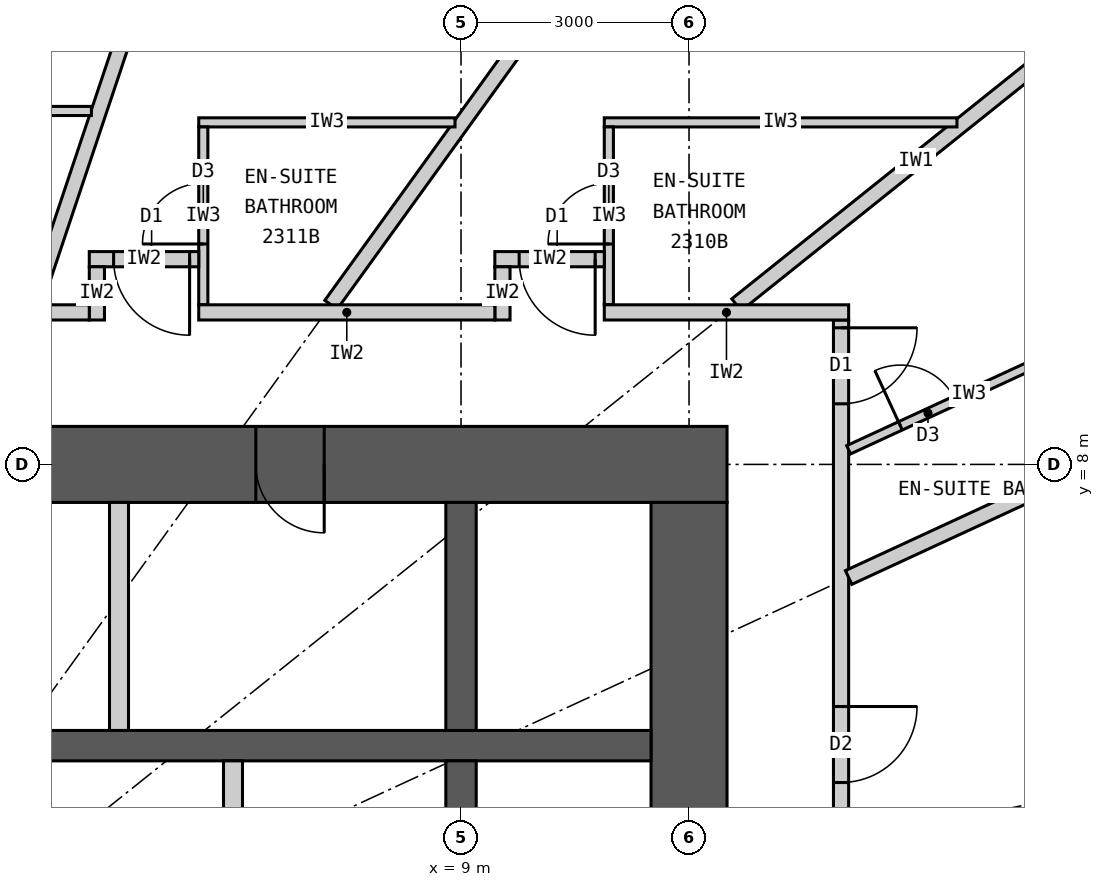
"""IFC4 building model, lengths in metres.
Left out: names, types, materials, properties, quantities, classifications, styles, units other than length and angle.
Written with IfcOpenShell. Run it as: python <this file> out.ifc"""

import sys

from ifc_helpers import new_model, si_unit, direction, frame, frame_2d, origin, place, context, subcontext, project, spatial, rectangle, extrude, element, fill, save


model = new_model("IFC4")
c1 = context("Model", 3, precision=1e-05, world=origin(), true_north=direction((0.0, 1.0)))
c2 = subcontext(c1, "Body", "Model", "MODEL_VIEW")
j1 = project(units=[si_unit("LENGTHUNIT", "METRE"), si_unit("PLANEANGLEUNIT", "RADIAN")], contexts=[c1])
p1 = place(None, origin())
s1 = spatial("IfcSite", under=j1, at=p1, CompositionType="ELEMENT")
p2 = place(p1, origin())
s2 = spatial("IfcBuilding", under=s1, at=p2, CompositionType="ELEMENT")
p3 = place(p2, frame((0.0, 0.0, 90.3)))
s3 = spatial("IfcBuildingStorey", under=s2, at=p3, CompositionType="ELEMENT", Elevation=90.3)
p4 = place(p3, frame((-12.5, 8.0, 0.0), z_axis=(0.0, 0.0, 1.0), x_axis=(1.0, 0.0, 0.0)))
e1 = element("IfcWall", 1, at=p4, inside=s3, PredefinedType="SHEAR", context=c2, shape_type="SweptSolid", body=[
    extrude(rectangle(XDim=25.0, YDim=1.0, at=frame_2d((12.5, 0.0))), origin(), (0.0, 0.0, 1.0), 3.3),
])
p5 = place(p4, frame((11.2, 0.0, 0.0)))
e2 = element("IfcOpeningElement", 2, at=p5, cuts=e1, PredefinedType="OPENING", context=c2, shape_type="SweptSolid", body=[
    extrude(rectangle(XDim=1.2, YDim=2.2, at=frame_2d((0.6, 1.1))), frame((0.0, 0.51, 0.0), z_axis=(0.0, -1.0, 0.0), x_axis=(1.0, 0.0, 0.0)), (0.0, 0.0, 1.0), 1.02),
])
p6 = place(p4, frame((18.8, 0.0, 0.0)))
e3 = element("IfcOpeningElement", 3, at=p6, cuts=e1, PredefinedType="OPENING", context=c2, shape_type="SweptSolid", body=[
    extrude(rectangle(XDim=0.9, YDim=2.2, at=frame_2d((0.45, 1.1))), frame((0.0, 0.51, 0.0), z_axis=(0.0, -1.0, 0.0), x_axis=(1.0, 0.0, 0.0)), (0.0, 0.0, 1.0), 1.02),
])
p7 = place(p3, frame((12.0, -7.5, 0.0), z_axis=(0.0, 0.0, 1.0), x_axis=(0.0, 1.0, 0.0)))
e4 = element("IfcWall", 4, at=p7, inside=s3, PredefinedType="SHEAR", context=c2, shape_type="SweptSolid", body=[
    extrude(rectangle(XDim=15.0, YDim=1.0, at=frame_2d((7.5, 0.0))), origin(), (0.0, 0.0, 1.0), 3.3),
])
p8 = place(p7, frame((6.6, 0.0, 0.0)))
e5 = element("IfcOpeningElement", 5, at=p8, cuts=e4, PredefinedType="OPENING", context=c2, shape_type="SweptSolid", body=[
    extrude(rectangle(XDim=1.8, YDim=2.2, at=frame_2d((0.9, 1.1))), frame((0.0, 0.51, 0.0), z_axis=(0.0, -1.0, 0.0), x_axis=(1.0, 0.0, 0.0)), (0.0, 0.0, 1.0), 1.02),
])
p9 = place(p3, frame((-11.5, 4.3, 0.0), z_axis=(0.0, 0.0, 1.0), x_axis=(1.0, 0.0, 0.0)))
e6 = element("IfcWall", 6, at=p9, inside=s3, PredefinedType="SHEAR", context=c2, shape_type="SweptSolid", body=[
    extrude(rectangle(XDim=23.0, YDim=0.4, at=frame_2d((11.5, 0.0))), origin(), (0.0, 0.0, 1.0), 3.3),
])
p10 = place(p3, frame((9.0, 4.5, 0.0), z_axis=(0.0, 0.0, 1.0), x_axis=(0.0, 1.0, 0.0)))
e7 = element("IfcWall", 7, at=p10, inside=s3, PredefinedType="SHEAR", context=c2, shape_type="SweptSolid", body=[
    extrude(rectangle(XDim=3.0, YDim=0.4, at=frame_2d((1.5, 0.0))), origin(), (0.0, 0.0, 1.0), 3.3),
])
p11 = place(p3, frame((9.0, 1.75, 0.0), z_axis=(0.0, 0.0, 1.0), x_axis=(0.0, 1.0, 0.0)))
e8 = element("IfcWall", 8, at=p11, inside=s3, PredefinedType="SHEAR", context=c2, shape_type="SweptSolid", body=[
    extrude(rectangle(XDim=2.35, YDim=0.4, at=frame_2d((1.175, 0.0))), origin(), (0.0, 0.0, 1.0), 3.3),
])
p12 = place(p3, frame((4.5, 4.5, 0.0), z_axis=(0.0, 0.0, 1.0), x_axis=(0.0, 1.0, 0.0)))
e9 = element("IfcWall", 9, at=p12, inside=s3, PredefinedType="PARTITIONING", context=c2, shape_type="SweptSolid", body=[
    extrude(rectangle(XDim=3.0, YDim=0.25, at=frame_2d((1.5, 0.0))), origin(), (0.0, 0.0, 1.0), 3.3),
])
p13 = place(p3, frame((6.0, 1.75, 0.0), z_axis=(0.0, 0.0, 1.0), x_axis=(0.0, 1.0, 0.0)))
e10 = element("IfcWall", 10, at=p13, inside=s3, PredefinedType="PARTITIONING", context=c2, shape_type="SweptSolid", body=[
    extrude(rectangle(XDim=2.35, YDim=0.25, at=frame_2d((1.175, 0.0))), origin(), (0.0, 0.0, 1.0), 3.3),
])
p14 = place(p3, frame((14.0, -9.9, 0.0), z_axis=(0.0, 0.0, 1.0), x_axis=(0.0, 1.0, 0.0)))
e11 = element("IfcWall", 11, at=p14, inside=s3, PredefinedType="PARTITIONING", context=c2, shape_type="SweptSolid", body=[
    extrude(rectangle(XDim=19.8, YDim=0.2, at=frame_2d((9.9, 0.0))), origin(), (0.0, 0.0, 1.0), 3.05),
])
p15 = place(p14, frame((0.204, 0.0, 0.0)))
e12 = element("IfcOpeningElement", 12, at=p15, cuts=e11, PredefinedType="OPENING", context=c2, shape_type="SweptSolid", body=[
    extrude(rectangle(XDim=1.0, YDim=2.2, at=frame_2d((0.5, 1.1))), frame((0.0, 0.11, 0.0), z_axis=(0.0, -1.0, 0.0), x_axis=(1.0, 0.0, 0.0)), (0.0, 0.0, 1.0), 0.22),
])
p16 = place(p14, frame((13.715, 0.0, 0.0)))
e13 = element("IfcOpeningElement", 13, at=p16, cuts=e11, PredefinedType="OPENING", context=c2, shape_type="SweptSolid", body=[
    extrude(rectangle(XDim=1.0, YDim=2.2, at=frame_2d((0.5, 1.1))), frame((0.0, 0.11, 0.0), z_axis=(0.0, -1.0, 0.0), x_axis=(1.0, 0.0, 0.0)), (0.0, 0.0, 1.0), 0.22),
])
p17 = place(p14, frame((18.698, 0.0, 0.0)))
e14 = element("IfcOpeningElement", 14, at=p17, cuts=e11, PredefinedType="OPENING", context=c2, shape_type="SweptSolid", body=[
    extrude(rectangle(XDim=1.0, YDim=2.2, at=frame_2d((0.5, 1.1))), frame((0.0, 0.11, 0.0), z_axis=(0.0, -1.0, 0.0), x_axis=(1.0, 0.0, 0.0)), (0.0, 0.0, 1.0), 0.22),
])
p18 = place(p3, frame((14.1, 6.512, 0.0), z_axis=(0.0, 0.0, 1.0), x_axis=(0.907832871056, 0.419332181247, 0.0)))
e15 = element("IfcWall", 15, at=p18, inside=s3, PredefinedType="PARTITIONING", context=c2, shape_type="SweptSolid", body=[
    extrude(rectangle(XDim=8.023, YDim=0.2, at=frame_2d((4.011, 0.0))), origin(), (0.0, 0.0, 1.0), 2.15),
])
p19 = place(p3, frame((12.625, 10.1, 0.0), z_axis=(0.0, 0.0, 1.0), x_axis=(0.780892451574, 0.624665493744, 0.0)))
e16 = element("IfcWall", 16, at=p19, inside=s3, PredefinedType="PARTITIONING", context=c2, shape_type="SweptSolid", body=[
    extrude(rectangle(XDim=6.045, YDim=0.2, at=frame_2d((3.022, 0.0))), origin(), (0.0, 0.0, 1.0), 2.25),
])
p20 = place(p3, frame((7.289, 10.1, 0.0), z_axis=(0.0, 0.0, 1.0), x_axis=(0.585198353053, 0.810890182197, 0.0)))
e17 = element("IfcWall", 17, at=p20, inside=s3, PredefinedType="PARTITIONING", context=c2, shape_type="SweptSolid", body=[
    extrude(rectangle(XDim=8.36, YDim=0.2, at=frame_2d((4.18, 0.0))), origin(), (0.0, 0.0, 1.0), 2.15),
])
p21 = place(p3, frame((3.383, 10.1, 0.0), z_axis=(0.0, 0.0, 1.0), x_axis=(0.31759592231, 0.948226149256, 0.0)))
e18 = element("IfcWall", 18, at=p21, inside=s3, PredefinedType="PARTITIONING", context=c2, shape_type="SweptSolid", body=[
    extrude(rectangle(XDim=9.098, YDim=0.2, at=frame_2d((4.549, 0.0))), origin(), (0.0, 0.0, 1.0), 2.15),
])
p22 = place(p3, frame((14.1, 8.193, 0.0), z_axis=(0.0, 0.0, 1.0), x_axis=(0.907836493557, 0.419324338628, 0.0)))
e19 = element("IfcWall", 19, at=p22, inside=s3, PredefinedType="PARTITIONING", context=c2, shape_type="SweptSolid", body=[
    extrude(rectangle(XDim=3.49, YDim=0.12, at=frame_2d((1.745, 0.0))), origin(), (0.0, 0.0, 1.0), 3.05),
])
p23 = place(p22, frame((0.75, 0.0, 0.0)))
e20 = element("IfcOpeningElement", 20, at=p23, cuts=e19, PredefinedType="OPENING", context=c2, shape_type="SweptSolid", body=[
    extrude(rectangle(XDim=0.8, YDim=2.1, at=frame_2d((0.4, 1.05))), frame((0.0, 0.07, 0.0), z_axis=(0.0, -1.0, 0.0), x_axis=(1.0, 0.0, 0.0)), (0.0, 0.0, 1.0), 0.14),
])
p24 = place(p3, frame((15.525, 12.5, 0.0), z_axis=(0.0, 0.0, 1.0), x_axis=(-1.0, 0.0, 0.0)))
e21 = element("IfcWall", 21, at=p24, inside=s3, PredefinedType="PARTITIONING", context=c2, shape_type="SweptSolid", body=[
    extrude(rectangle(XDim=4.64, YDim=0.12, at=frame_2d((2.32, 0.0))), origin(), (0.0, 0.0, 1.0), 3.05),
])
p25 = place(p3, frame((10.945, 10.1, 0.0), z_axis=(0.0, 0.0, 1.0), x_axis=(0.0, 1.0, 0.0)))
e22 = element("IfcWall", 22, at=p25, inside=s3, PredefinedType="PARTITIONING", context=c2, shape_type="SweptSolid", body=[
    extrude(rectangle(XDim=2.34, YDim=0.12, at=frame_2d((1.17, 0.0))), origin(), (0.0, 0.0, 1.0), 3.05),
])
p26 = place(p25, frame((0.8, 0.0, 0.0)))
e23 = element("IfcOpeningElement", 23, at=p26, cuts=e22, PredefinedType="OPENING", context=c2, shape_type="SweptSolid", body=[
    extrude(rectangle(XDim=0.8, YDim=2.1, at=frame_2d((0.4, 1.05))), frame((0.0, 0.07, 0.0), z_axis=(0.0, -1.0, 0.0), x_axis=(1.0, 0.0, 0.0)), (0.0, 0.0, 1.0), 0.14),
])
p27 = place(p3, frame((8.921, 12.5, 0.0), z_axis=(0.0, 0.0, 1.0), x_axis=(-1.0, 0.0, 0.0)))
e24 = element("IfcWall", 24, at=p27, inside=s3, PredefinedType="PARTITIONING", context=c2, shape_type="SweptSolid", body=[
    extrude(rectangle(XDim=3.372, YDim=0.12, at=frame_2d((1.686, 0.0))), origin(), (0.0, 0.0, 1.0), 3.05),
])
p28 = place(p3, frame((5.609, 10.1, 0.0), z_axis=(0.0, 0.0, 1.0), x_axis=(0.0, 1.0, 0.0)))
e25 = element("IfcWall", 25, at=p28, inside=s3, PredefinedType="PARTITIONING", context=c2, shape_type="SweptSolid", body=[
    extrude(rectangle(XDim=2.34, YDim=0.12, at=frame_2d((1.17, 0.0))), origin(), (0.0, 0.0, 1.0), 3.05),
])
p29 = place(p28, frame((0.8, 0.0, 0.0)))
e26 = element("IfcOpeningElement", 26, at=p29, cuts=e25, PredefinedType="OPENING", context=c2, shape_type="SweptSolid", body=[
    extrude(rectangle(XDim=0.8, YDim=2.1, at=frame_2d((0.4, 1.05))), frame((0.0, 0.07, 0.0), z_axis=(0.0, -1.0, 0.0), x_axis=(1.0, 0.0, 0.0)), (0.0, 0.0, 1.0), 0.14),
])
p30 = place(p3, frame((4.137, 12.65, 0.0), z_axis=(0.0, 0.0, 1.0), x_axis=(-1.0, 0.0, 0.0)))
e27 = element("IfcWall", 27, at=p30, inside=s3, PredefinedType="PARTITIONING", context=c2, shape_type="SweptSolid", body=[
    extrude(rectangle(XDim=2.494, YDim=0.12, at=frame_2d((1.247, 0.0))), origin(), (0.0, 0.0, 1.0), 3.05),
])
p31 = place(p3, frame((9.445, 10.7, 0.0), z_axis=(0.0, 0.0, 1.0), x_axis=(1.0, 0.0, 0.0)))
e28 = element("IfcWall", 28, at=p31, inside=s3, PredefinedType="PARTITIONING", context=c2, shape_type="SweptSolid", body=[
    extrude(rectangle(XDim=1.44, YDim=0.2, at=frame_2d((0.72, 0.0))), origin(), (0.0, 0.0, 1.0), 3.05),
])
p32 = place(p31, frame((0.32, 0.0, 0.0)))
e29 = element("IfcOpeningElement", 29, at=p32, cuts=e28, PredefinedType="OPENING", context=c2, shape_type="SweptSolid", body=[
    extrude(rectangle(XDim=1.0, YDim=2.2, at=frame_2d((0.5, 1.1))), frame((0.0, 0.11, 0.0), z_axis=(0.0, -1.0, 0.0), x_axis=(1.0, 0.0, 0.0)), (0.0, 0.0, 1.0), 0.22),
])
p33 = place(p3, frame((9.545, 9.9, 0.0), z_axis=(0.0, 0.0, 1.0), x_axis=(0.0, 1.0, 0.0)))
e30 = element("IfcWall", 30, at=p33, inside=s3, PredefinedType="PARTITIONING", context=c2, shape_type="SweptSolid", body=[
    extrude(rectangle(XDim=0.7, YDim=0.2, at=frame_2d((0.35, 0.0))), origin(), (0.0, 0.0, 1.0), 3.05),
])
p34 = place(p3, frame((4.109, 10.7, 0.0), z_axis=(0.0, 0.0, 1.0), x_axis=(1.0, 0.0, 0.0)))
e31 = element("IfcWall", 31, at=p34, inside=s3, PredefinedType="PARTITIONING", context=c2, shape_type="SweptSolid", body=[
    extrude(rectangle(XDim=1.44, YDim=0.2, at=frame_2d((0.72, 0.0))), origin(), (0.0, 0.0, 1.0), 3.05),
])
p35 = place(p34, frame((0.32, 0.0, 0.0)))
e32 = element("IfcOpeningElement", 32, at=p35, cuts=e31, PredefinedType="OPENING", context=c2, shape_type="SweptSolid", body=[
    extrude(rectangle(XDim=1.0, YDim=2.2, at=frame_2d((0.5, 1.1))), frame((0.0, 0.11, 0.0), z_axis=(0.0, -1.0, 0.0), x_axis=(1.0, 0.0, 0.0)), (0.0, 0.0, 1.0), 0.22),
])
p36 = place(p3, frame((4.209, 9.9, 0.0), z_axis=(0.0, 0.0, 1.0), x_axis=(0.0, 1.0, 0.0)))
e33 = element("IfcWall", 33, at=p36, inside=s3, PredefinedType="PARTITIONING", context=c2, shape_type="SweptSolid", body=[
    extrude(rectangle(XDim=0.7, YDim=0.2, at=frame_2d((0.35, 0.0))), origin(), (0.0, 0.0, 1.0), 3.05),
])
p37 = place(p3, frame((1.643, 10.0, 0.0), z_axis=(0.0, 0.0, 1.0), x_axis=(1.0, 0.0, 0.0)))
e34 = element("IfcWall", 34, at=p37, inside=s3, PredefinedType="PARTITIONING", context=c2, shape_type="SweptSolid", body=[
    extrude(rectangle(XDim=2.466, YDim=0.2, at=frame_2d((1.233, 0.0))), origin(), (0.0, 0.0, 1.0), 3.05),
])
p38 = place(p3, frame((5.549, 10.0, 0.0), z_axis=(0.0, 0.0, 1.0), x_axis=(1.0, 0.0, 0.0)))
e35 = element("IfcWall", 35, at=p38, inside=s3, PredefinedType="PARTITIONING", context=c2, shape_type="SweptSolid", body=[
    extrude(rectangle(XDim=3.896, YDim=0.2, at=frame_2d((1.948, 0.0))), origin(), (0.0, 0.0, 1.0), 3.05),
])
p39 = place(p3, frame((10.885, 10.0, 0.0), z_axis=(0.0, 0.0, 1.0), x_axis=(1.0, 0.0, 0.0)))
e36 = element("IfcWall", 36, at=p39, inside=s3, PredefinedType="PARTITIONING", context=c2, shape_type="SweptSolid", body=[
    extrude(rectangle(XDim=3.215, YDim=0.2, at=frame_2d((1.607, 0.0))), origin(), (0.0, 0.0, 1.0), 3.05),
])
p40 = place(p16, origin())
e37 = element("IfcDoor", 37, at=p40, inside=s3, OperationType="SINGLE_SWING_RIGHT", PredefinedType="DOOR", context=c2, shape_type="SweptSolid", body=[
    extrude(rectangle(XDim=1.0, YDim=2.2, at=frame_2d((0.5, 1.1))), frame((0.0, 0.025, 0.0), z_axis=(0.0, -1.0, 0.0), x_axis=(1.0, 0.0, 0.0)), (0.0, 0.0, 1.0), 0.05),
])
fill(e13, e37)
p41 = place(p23, origin())
e38 = element("IfcDoor", 38, at=p41, inside=s3, OperationType="SINGLE_SWING_LEFT", PredefinedType="DOOR", context=c2, shape_type="SweptSolid", body=[
    extrude(rectangle(XDim=0.8, YDim=2.1, at=frame_2d((0.4, 1.05))), frame((0.0, 0.025, 0.0), z_axis=(0.0, -1.0, 0.0), x_axis=(1.0, 0.0, 0.0)), (0.0, 0.0, 1.0), 0.05),
])
fill(e20, e38)
p42 = place(p17, origin())
e39 = element("IfcDoor", 39, at=p42, inside=s3, OperationType="SINGLE_SWING_RIGHT", PredefinedType="DOOR", context=c2, shape_type="SweptSolid", body=[
    extrude(rectangle(XDim=1.0, YDim=2.2, at=frame_2d((0.5, 1.1))), frame((0.0, 0.025, 0.0), z_axis=(0.0, -1.0, 0.0), x_axis=(1.0, 0.0, 0.0)), (0.0, 0.0, 1.0), 0.05),
])
fill(e14, e39)
p43 = place(p26, origin())
e40 = element("IfcDoor", 40, at=p43, inside=s3, OperationType="SINGLE_SWING_LEFT", PredefinedType="DOOR", context=c2, shape_type="SweptSolid", body=[
    extrude(rectangle(XDim=0.8, YDim=2.1, at=frame_2d((0.4, 1.05))), frame((0.0, 0.025, 0.0), z_axis=(0.0, -1.0, 0.0), x_axis=(1.0, 0.0, 0.0)), (0.0, 0.0, 1.0), 0.05),
])
fill(e23, e40)
p44 = place(p32, origin())
e41 = element("IfcDoor", 41, at=p44, inside=s3, OperationType="SINGLE_SWING_RIGHT", PredefinedType="DOOR", context=c2, shape_type="SweptSolid", body=[
    extrude(rectangle(XDim=1.0, YDim=2.2, at=frame_2d((0.5, 1.1))), frame((0.0, 0.025, 0.0), z_axis=(0.0, -1.0, 0.0), x_axis=(1.0, 0.0, 0.0)), (0.0, 0.0, 1.0), 0.05),
])
fill(e29, e41)
p45 = place(p29, origin())
e42 = element("IfcDoor", 42, at=p45, inside=s3, OperationType="SINGLE_SWING_LEFT", PredefinedType="DOOR", context=c2, shape_type="SweptSolid", body=[
    extrude(rectangle(XDim=0.8, YDim=2.1, at=frame_2d((0.4, 1.05))), frame((0.0, 0.025, 0.0), z_axis=(0.0, -1.0, 0.0), x_axis=(1.0, 0.0, 0.0)), (0.0, 0.0, 1.0), 0.05),
])
fill(e26, e42)
p46 = place(p35, origin())
e43 = element("IfcDoor", 43, at=p46, inside=s3, OperationType="SINGLE_SWING_RIGHT", PredefinedType="DOOR", context=c2, shape_type="SweptSolid", body=[
    extrude(rectangle(XDim=1.0, YDim=2.2, at=frame_2d((0.5, 1.1))), frame((0.0, 0.025, 0.0), z_axis=(0.0, -1.0, 0.0), x_axis=(1.0, 0.0, 0.0)), (0.0, 0.0, 1.0), 0.05),
])
fill(e32, e43)
p47 = place(p6, origin())
e44 = element("IfcDoor", 44, at=p47, inside=s3, OperationType="SINGLE_SWING_RIGHT", PredefinedType="DOOR", context=c2, shape_type="SweptSolid", body=[
    extrude(rectangle(XDim=0.9, YDim=2.2, at=frame_2d((0.45, 1.1))), frame((0.0, 0.025, 0.0), z_axis=(0.0, -1.0, 0.0), x_axis=(1.0, 0.0, 0.0)), (0.0, 0.0, 1.0), 0.05),
])
fill(e3, e44)
save(model, sys.argv[1])
